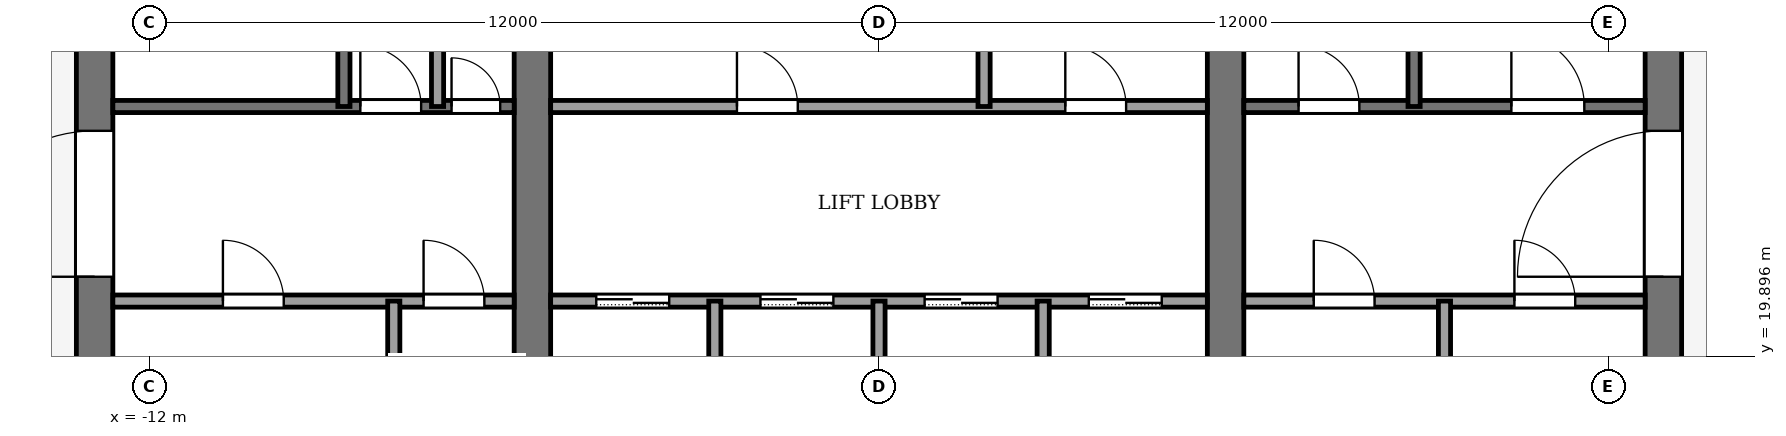
"""IFC4 building model, lengths in metres.
Left out: names, types, materials, properties, quantities, classifications, styles, units other than length and angle.
Written with IfcOpenShell. Run it as: python <this file> out.ifc"""

import sys

from ifc_helpers import new_model, si_unit, direction, frame, frame_2d, origin, place, context, subcontext, project, spatial, rectangle, extrude, element, fill, save


model = new_model("IFC4")
c1 = context("Model", 3, precision=1e-05, world=origin(), true_north=direction((0.0, 1.0)))
c2 = subcontext(c1, "Body", "Model", "MODEL_VIEW")
j1 = project(units=[si_unit("LENGTHUNIT", "METRE"), si_unit("PLANEANGLEUNIT", "RADIAN")], contexts=[c1])
p1 = place(None, origin())
s1 = spatial("IfcSite", under=j1, at=p1, CompositionType="ELEMENT")
p2 = place(p1, origin())
s2 = spatial("IfcBuilding", under=s1, at=p2, CompositionType="ELEMENT")
p3 = place(p2, frame((0.0, 0.0, 330.0)))
s3 = spatial("IfcBuildingStorey", under=s2, at=p3, CompositionType="ELEMENT", Elevation=330.0)
p4 = place(p3, frame((-12.9, 18.4, -0.13), z_axis=(0.0, 0.0, 1.0), x_axis=(0.0, 1.0, 0.0)))
e1 = element("IfcWall", 1, at=p4, inside=s3, PredefinedType="SHEAR", context=c2, shape_type="SweptSolid", body=[
    extrude(rectangle(XDim=19.2, YDim=0.6, at=frame_2d((9.6, 0.0))), origin(), (0.0, 0.0, 1.0), 3.95),
])
p5 = place(p4, frame((2.8, 0.0, 0.13)))
e2 = element("IfcOpeningElement", 2, at=p5, cuts=e1, PredefinedType="OPENING", context=c2, shape_type="SweptSolid", body=[
    extrude(rectangle(XDim=2.4, YDim=2.4, at=frame_2d((1.2, 1.2))), frame((0.0, 0.31, 0.0), z_axis=(0.0, -1.0, 0.0), x_axis=(1.0, 0.0, 0.0)), (0.0, 0.0, 1.0), 0.62),
])
p6 = place(p4, frame((13.4, 0.0, 0.13)))
e3 = element("IfcOpeningElement", 3, at=p6, cuts=e1, PredefinedType="OPENING", context=c2, shape_type="SweptSolid", body=[
    extrude(rectangle(XDim=1.4, YDim=2.2, at=frame_2d((0.7, 1.1))), frame((0.0, 0.31, 0.0), z_axis=(0.0, -1.0, 0.0), x_axis=(1.0, 0.0, 0.0)), (0.0, 0.0, 1.0), 0.62),
])
p7 = place(p3, frame((12.9, 18.4, -0.13), z_axis=(0.0, 0.0, 1.0), x_axis=(0.0, 1.0, 0.0)))
e4 = element("IfcWall", 4, at=p7, inside=s3, PredefinedType="SHEAR", context=c2, shape_type="SweptSolid", body=[
    extrude(rectangle(XDim=19.2, YDim=0.6, at=frame_2d((9.6, 0.0))), origin(), (0.0, 0.0, 1.0), 3.95),
])
p8 = place(p7, frame((2.8, 0.0, 0.13)))
e5 = element("IfcOpeningElement", 5, at=p8, cuts=e4, PredefinedType="OPENING", context=c2, shape_type="SweptSolid", body=[
    extrude(rectangle(XDim=2.4, YDim=2.4, at=frame_2d((1.2, 1.2))), frame((0.0, 0.31, 0.0), z_axis=(0.0, -1.0, 0.0), x_axis=(1.0, 0.0, 0.0)), (0.0, 0.0, 1.0), 0.62),
])
p9 = place(p7, frame((13.3, 0.0, 0.13)))
e6 = element("IfcOpeningElement", 6, at=p9, cuts=e4, PredefinedType="OPENING", context=c2, shape_type="SweptSolid", body=[
    extrude(rectangle(XDim=2.4, YDim=2.4, at=frame_2d((1.2, 1.2))), frame((0.0, 0.31, 0.0), z_axis=(0.0, -1.0, 0.0), x_axis=(1.0, 0.0, 0.0)), (0.0, 0.0, 1.0), 0.62),
])
p10 = place(p3, frame((-5.7, 18.4, -0.13), z_axis=(0.0, 0.0, 1.0), x_axis=(0.0, 1.0, 0.0)))
e7 = element("IfcWall", 7, at=p10, inside=s3, PredefinedType="SHEAR", context=c2, shape_type="SweptSolid", body=[
    extrude(rectangle(XDim=19.2, YDim=0.6, at=frame_2d((9.6, 0.0))), origin(), (0.0, 0.0, 1.0), 3.95),
])
p11 = place(p10, frame((8.35, 0.0, 0.13)))
e8 = element("IfcOpeningElement", 8, at=p11, cuts=e7, PredefinedType="OPENING", context=c2, shape_type="SweptSolid", body=[
    extrude(rectangle(XDim=0.9, YDim=2.1, at=frame_2d((0.45, 1.05))), frame((0.0, 0.31, 0.0), z_axis=(0.0, -1.0, 0.0), x_axis=(1.0, 0.0, 0.0)), (0.0, 0.0, 1.0), 0.62),
])
p12 = place(p3, frame((5.7, 18.4, -0.13), z_axis=(0.0, 0.0, 1.0), x_axis=(0.0, 1.0, 0.0)))
e9 = element("IfcWall", 9, at=p12, inside=s3, PredefinedType="SHEAR", context=c2, shape_type="SweptSolid", body=[
    extrude(rectangle(XDim=19.2, YDim=0.6, at=frame_2d((9.6, 0.0))), origin(), (0.0, 0.0, 1.0), 3.95),
])
p13 = place(p12, frame((8.35, 0.0, 0.13)))
e10 = element("IfcOpeningElement", 10, at=p13, cuts=e9, PredefinedType="OPENING", context=c2, shape_type="SweptSolid", body=[
    extrude(rectangle(XDim=0.9, YDim=2.1, at=frame_2d((0.45, 1.05))), frame((0.0, 0.31, 0.0), z_axis=(0.0, -1.0, 0.0), x_axis=(1.0, 0.0, 0.0)), (0.0, 0.0, 1.0), 0.62),
])
p14 = place(p12, frame((13.3, 0.0, 0.13)))
e11 = element("IfcOpeningElement", 11, at=p14, cuts=e9, PredefinedType="OPENING", context=c2, shape_type="SweptSolid", body=[
    extrude(rectangle(XDim=2.4, YDim=2.4, at=frame_2d((1.2, 1.2))), frame((0.0, 0.31, 0.0), z_axis=(0.0, -1.0, 0.0), x_axis=(1.0, 0.0, 0.0)), (0.0, 0.0, 1.0), 0.62),
])
p15 = place(p3, frame((-12.6, 20.8, 0.0), z_axis=(0.0, 0.0, 1.0), x_axis=(1.0, 0.0, 0.0)))
e12 = element("IfcWall", 12, at=p15, inside=s3, PredefinedType="PARTITIONING", context=c2, shape_type="SweptSolid", body=[
    extrude(rectangle(XDim=6.6, YDim=0.2, at=frame_2d((3.3, 0.0))), origin(), (0.0, 0.0, 1.0), 3.82),
])
p16 = place(p15, frame((1.81, 0.0, 0.0)))
e13 = element("IfcOpeningElement", 13, at=p16, cuts=e12, PredefinedType="OPENING", context=c2, shape_type="SweptSolid", body=[
    extrude(rectangle(XDim=1.0, YDim=2.1, at=frame_2d((0.5, 1.05))), frame((0.0, 0.11, 0.0), z_axis=(0.0, -1.0, 0.0), x_axis=(1.0, 0.0, 0.0)), (0.0, 0.0, 1.0), 0.22),
])
p17 = place(p15, frame((5.11, 0.0, 0.0)))
e14 = element("IfcOpeningElement", 14, at=p17, cuts=e12, PredefinedType="OPENING", context=c2, shape_type="SweptSolid", body=[
    extrude(rectangle(XDim=1.0, YDim=2.1, at=frame_2d((0.5, 1.05))), frame((0.0, 0.11, 0.0), z_axis=(0.0, -1.0, 0.0), x_axis=(1.0, 0.0, 0.0)), (0.0, 0.0, 1.0), 0.22),
])
p18 = place(p3, frame((-5.4, 20.8, 0.0), z_axis=(0.0, 0.0, 1.0), x_axis=(1.0, 0.0, 0.0)))
e15 = element("IfcWall", 15, at=p18, inside=s3, PredefinedType="PARTITIONING", context=c2, shape_type="SweptSolid", body=[
    extrude(rectangle(XDim=10.8, YDim=0.2, at=frame_2d((5.4, 0.0))), origin(), (0.0, 0.0, 1.0), 3.82),
])
p19 = place(p18, frame((0.75, 0.0, 0.0)))
e16 = element("IfcOpeningElement", 16, at=p19, cuts=e15, PredefinedType="OPENING", context=c2, shape_type="SweptSolid", body=[
    extrude(rectangle(XDim=1.2, YDim=2.2, at=frame_2d((0.6, 1.1))), frame((0.0, 0.11, 0.0), z_axis=(0.0, -1.0, 0.0), x_axis=(1.0, 0.0, 0.0)), (0.0, 0.0, 1.0), 0.22),
])
p20 = place(p18, frame((3.45, 0.0, 0.0)))
e17 = element("IfcOpeningElement", 17, at=p20, cuts=e15, PredefinedType="OPENING", context=c2, shape_type="SweptSolid", body=[
    extrude(rectangle(XDim=1.2, YDim=2.2, at=frame_2d((0.6, 1.1))), frame((0.0, 0.11, 0.0), z_axis=(0.0, -1.0, 0.0), x_axis=(1.0, 0.0, 0.0)), (0.0, 0.0, 1.0), 0.22),
])
p21 = place(p18, frame((6.15, 0.0, 0.0)))
e18 = element("IfcOpeningElement", 18, at=p21, cuts=e15, PredefinedType="OPENING", context=c2, shape_type="SweptSolid", body=[
    extrude(rectangle(XDim=1.2, YDim=2.2, at=frame_2d((0.6, 1.1))), frame((0.0, 0.11, 0.0), z_axis=(0.0, -1.0, 0.0), x_axis=(1.0, 0.0, 0.0)), (0.0, 0.0, 1.0), 0.22),
])
p22 = place(p18, frame((8.85, 0.0, 0.0)))
e19 = element("IfcOpeningElement", 19, at=p22, cuts=e15, PredefinedType="OPENING", context=c2, shape_type="SweptSolid", body=[
    extrude(rectangle(XDim=1.2, YDim=2.2, at=frame_2d((0.6, 1.1))), frame((0.0, 0.11, 0.0), z_axis=(0.0, -1.0, 0.0), x_axis=(1.0, 0.0, 0.0)), (0.0, 0.0, 1.0), 0.22),
])
p23 = place(p3, frame((6.0, 20.8, 0.0), z_axis=(0.0, 0.0, 1.0), x_axis=(1.0, 0.0, 0.0)))
e20 = element("IfcWall", 20, at=p23, inside=s3, PredefinedType="PARTITIONING", context=c2, shape_type="SweptSolid", body=[
    extrude(rectangle(XDim=6.6, YDim=0.2, at=frame_2d((3.3, 0.0))), origin(), (0.0, 0.0, 1.0), 3.82),
])
p24 = place(p23, frame((1.15, 0.0, 0.0)))
e21 = element("IfcOpeningElement", 21, at=p24, cuts=e20, PredefinedType="OPENING", context=c2, shape_type="SweptSolid", body=[
    extrude(rectangle(XDim=1.0, YDim=2.1, at=frame_2d((0.5, 1.05))), frame((0.0, 0.11, 0.0), z_axis=(0.0, -1.0, 0.0), x_axis=(1.0, 0.0, 0.0)), (0.0, 0.0, 1.0), 0.22),
])
p25 = place(p23, frame((4.45, 0.0, 0.0)))
e22 = element("IfcOpeningElement", 22, at=p25, cuts=e20, PredefinedType="OPENING", context=c2, shape_type="SweptSolid", body=[
    extrude(rectangle(XDim=1.0, YDim=2.1, at=frame_2d((0.5, 1.05))), frame((0.0, 0.11, 0.0), z_axis=(0.0, -1.0, 0.0), x_axis=(1.0, 0.0, 0.0)), (0.0, 0.0, 1.0), 0.22),
])
p26 = place(p3, frame((-12.6, 24.0, 0.0), z_axis=(0.0, 0.0, 1.0), x_axis=(1.0, 0.0, 0.0)))
e23 = element("IfcWall", 23, at=p26, inside=s3, PredefinedType="PARTITIONING", context=c2, shape_type="SweptSolid", body=[
    extrude(rectangle(XDim=6.6, YDim=0.2, at=frame_2d((3.3, 0.0))), origin(), (0.0, 0.0, 1.0), 3.82),
])
p27 = place(p26, frame((4.07, 0.0, 0.0)))
e24 = element("IfcOpeningElement", 24, at=p27, cuts=e23, PredefinedType="OPENING", context=c2, shape_type="SweptSolid", body=[
    extrude(rectangle(XDim=1.0, YDim=2.1, at=frame_2d((0.5, 1.05))), frame((0.0, 0.11, 0.0), z_axis=(0.0, -1.0, 0.0), x_axis=(1.0, 0.0, 0.0)), (0.0, 0.0, 1.0), 0.22),
])
p28 = place(p26, frame((5.57, 0.0, 0.0)))
e25 = element("IfcOpeningElement", 25, at=p28, cuts=e23, PredefinedType="OPENING", context=c2, shape_type="SweptSolid", body=[
    extrude(rectangle(XDim=0.8, YDim=2.1, at=frame_2d((0.4, 1.05))), frame((0.0, 0.11, 0.0), z_axis=(0.0, -1.0, 0.0), x_axis=(1.0, 0.0, 0.0)), (0.0, 0.0, 1.0), 0.22),
])
p29 = place(p3, frame((-5.4, 24.0, 0.0), z_axis=(0.0, 0.0, 1.0), x_axis=(1.0, 0.0, 0.0)))
e26 = element("IfcWall", 26, at=p29, inside=s3, PredefinedType="PARTITIONING", context=c2, shape_type="SweptSolid", body=[
    extrude(rectangle(XDim=10.8, YDim=0.2, at=frame_2d((5.4, 0.0))), origin(), (0.0, 0.0, 1.0), 3.82),
])
p30 = place(p29, frame((3.064, 0.0, 0.0)))
e27 = element("IfcOpeningElement", 27, at=p30, cuts=e26, PredefinedType="OPENING", context=c2, shape_type="SweptSolid", body=[
    extrude(rectangle(XDim=1.0, YDim=2.1, at=frame_2d((0.5, 1.05))), frame((0.0, 0.11, 0.0), z_axis=(0.0, -1.0, 0.0), x_axis=(1.0, 0.0, 0.0)), (0.0, 0.0, 1.0), 0.22),
])
p31 = place(p29, frame((8.464, 0.0, 0.0)))
e28 = element("IfcOpeningElement", 28, at=p31, cuts=e26, PredefinedType="OPENING", context=c2, shape_type="SweptSolid", body=[
    extrude(rectangle(XDim=1.0, YDim=2.1, at=frame_2d((0.5, 1.05))), frame((0.0, 0.11, 0.0), z_axis=(0.0, -1.0, 0.0), x_axis=(1.0, 0.0, 0.0)), (0.0, 0.0, 1.0), 0.22),
])
p32 = place(p3, frame((6.0, 24.0, 0.0), z_axis=(0.0, 0.0, 1.0), x_axis=(1.0, 0.0, 0.0)))
e29 = element("IfcWall", 29, at=p32, inside=s3, PredefinedType="PARTITIONING", context=c2, shape_type="SweptSolid", body=[
    extrude(rectangle(XDim=6.6, YDim=0.2, at=frame_2d((3.3, 0.0))), origin(), (0.0, 0.0, 1.0), 3.82),
])
p33 = place(p32, frame((0.9, 0.0, 0.0)))
e30 = element("IfcOpeningElement", 30, at=p33, cuts=e29, PredefinedType="OPENING", context=c2, shape_type="SweptSolid", body=[
    extrude(rectangle(XDim=1.0, YDim=2.1, at=frame_2d((0.5, 1.05))), frame((0.0, 0.11, 0.0), z_axis=(0.0, -1.0, 0.0), x_axis=(1.0, 0.0, 0.0)), (0.0, 0.0, 1.0), 0.22),
])
p34 = place(p32, frame((4.4, 0.0, 0.0)))
e31 = element("IfcOpeningElement", 31, at=p34, cuts=e29, PredefinedType="OPENING", context=c2, shape_type="SweptSolid", body=[
    extrude(rectangle(XDim=1.2, YDim=2.2, at=frame_2d((0.6, 1.1))), frame((0.0, 0.11, 0.0), z_axis=(0.0, -1.0, 0.0), x_axis=(1.0, 0.0, 0.0)), (0.0, 0.0, 1.0), 0.22),
])
p35 = place(p3, frame((-8.8, 24.0, 0.0), z_axis=(0.0, 0.0, 1.0), x_axis=(0.0, 1.0, 0.0)))
e32 = element("IfcWall", 32, at=p35, inside=s3, PredefinedType="PARTITIONING", context=c2, shape_type="SweptSolid", body=[
    extrude(rectangle(XDim=7.4, YDim=0.2, at=frame_2d((3.7, 0.0))), origin(), (0.0, 0.0, 1.0), 3.82),
])
p36 = place(p3, frame((-7.98, 18.4, 0.0), z_axis=(0.0, 0.0, 1.0), x_axis=(0.0, 1.0, 0.0)))
e33 = element("IfcWall", 33, at=p36, inside=s3, PredefinedType="PARTITIONING", context=c2, shape_type="SweptSolid", body=[
    extrude(rectangle(XDim=2.4, YDim=0.2, at=frame_2d((1.2, 0.0))), origin(), (0.0, 0.0, 1.0), 3.82),
])
p37 = place(p3, frame((-7.26, 24.0, 0.0), z_axis=(0.0, 0.0, 1.0), x_axis=(0.0, 1.0, 0.0)))
e34 = element("IfcWall", 34, at=p37, inside=s3, PredefinedType="PARTITIONING", context=c2, shape_type="SweptSolid", body=[
    extrude(rectangle(XDim=7.4, YDim=0.2, at=frame_2d((3.7, 0.0))), origin(), (0.0, 0.0, 1.0), 3.82),
])
for number, where, z_axis, x_axis in (
    (35, (-2.7, 18.4, 0.0), (0.0, 0.0, 1.0), (0.0, 1.0, 0.0)),
    (36, (0.0, 18.4, 0.0), (0.0, 0.0, 1.0), (0.0, 1.0, 0.0)),
):
    element("IfcWall", number, at=place(p3, frame(where, z_axis=z_axis, x_axis=x_axis)), inside=s3, PredefinedType="PARTITIONING", context=c2, shape_type="SweptSolid", body=[
        extrude(rectangle(XDim=2.4, YDim=0.2, at=frame_2d((1.2, 0.0))), origin(), (0.0, 0.0, 1.0), 3.82),
    ])
p38 = place(p3, frame((1.728, 24.0, 0.0), z_axis=(0.0, 0.0, 1.0), x_axis=(0.0, 1.0, 0.0)))
e37 = element("IfcWall", 37, at=p38, inside=s3, PredefinedType="PARTITIONING", context=c2, shape_type="SweptSolid", body=[
    extrude(rectangle(XDim=2.4, YDim=0.2, at=frame_2d((1.2, 0.0))), origin(), (0.0, 0.0, 1.0), 3.82),
])
p39 = place(p3, frame((2.7, 18.4, 0.0), z_axis=(0.0, 0.0, 1.0), x_axis=(0.0, 1.0, 0.0)))
e38 = element("IfcWall", 38, at=p39, inside=s3, PredefinedType="PARTITIONING", context=c2, shape_type="SweptSolid", body=[
    extrude(rectangle(XDim=2.4, YDim=0.2, at=frame_2d((1.2, 0.0))), origin(), (0.0, 0.0, 1.0), 3.82),
])
p40 = place(p3, frame((8.8, 24.0, 0.0), z_axis=(0.0, 0.0, 1.0), x_axis=(0.0, 1.0, 0.0)))
e39 = element("IfcWall", 39, at=p40, inside=s3, PredefinedType="PARTITIONING", context=c2, shape_type="SweptSolid", body=[
    extrude(rectangle(XDim=7.4, YDim=0.2, at=frame_2d((3.7, 0.0))), origin(), (0.0, 0.0, 1.0), 3.82),
])
p41 = place(p3, frame((9.3, 18.4, 0.0), z_axis=(0.0, 0.0, 1.0), x_axis=(0.0, 1.0, 0.0)))
e40 = element("IfcWall", 40, at=p41, inside=s3, PredefinedType="PARTITIONING", context=c2, shape_type="SweptSolid", body=[
    extrude(rectangle(XDim=2.4, YDim=0.2, at=frame_2d((1.2, 0.0))), origin(), (0.0, 0.0, 1.0), 3.82),
])
p42 = place(p19, origin())
e41 = element("IfcDoor", 41, at=p42, inside=s3, OperationType="SLIDING_TO_LEFT", PredefinedType="DOOR", context=c2, shape_type="SweptSolid", body=[
    extrude(rectangle(XDim=1.2, YDim=2.2, at=frame_2d((0.6, 1.1))), frame((0.0, 0.025, 0.0), z_axis=(0.0, -1.0, 0.0), x_axis=(1.0, 0.0, 0.0)), (0.0, 0.0, 1.0), 0.05),
])
fill(e16, e41)
p43 = place(p20, origin())
e42 = element("IfcDoor", 42, at=p43, inside=s3, OperationType="SLIDING_TO_LEFT", PredefinedType="DOOR", context=c2, shape_type="SweptSolid", body=[
    extrude(rectangle(XDim=1.2, YDim=2.2, at=frame_2d((0.6, 1.1))), frame((0.0, 0.025, 0.0), z_axis=(0.0, -1.0, 0.0), x_axis=(1.0, 0.0, 0.0)), (0.0, 0.0, 1.0), 0.05),
])
fill(e17, e42)
p44 = place(p21, origin())
e43 = element("IfcDoor", 43, at=p44, inside=s3, OperationType="SLIDING_TO_LEFT", PredefinedType="DOOR", context=c2, shape_type="SweptSolid", body=[
    extrude(rectangle(XDim=1.2, YDim=2.2, at=frame_2d((0.6, 1.1))), frame((0.0, 0.025, 0.0), z_axis=(0.0, -1.0, 0.0), x_axis=(1.0, 0.0, 0.0)), (0.0, 0.0, 1.0), 0.05),
])
fill(e18, e43)
p45 = place(p22, origin())
e44 = element("IfcDoor", 44, at=p45, inside=s3, OperationType="SLIDING_TO_LEFT", PredefinedType="DOOR", context=c2, shape_type="SweptSolid", body=[
    extrude(rectangle(XDim=1.2, YDim=2.2, at=frame_2d((0.6, 1.1))), frame((0.0, 0.025, 0.0), z_axis=(0.0, -1.0, 0.0), x_axis=(1.0, 0.0, 0.0)), (0.0, 0.0, 1.0), 0.05),
])
fill(e19, e44)
p46 = place(p30, origin())
e45 = element("IfcDoor", 45, at=p46, inside=s3, OperationType="SINGLE_SWING_RIGHT", PredefinedType="DOOR", context=c2, shape_type="SweptSolid", body=[
    extrude(rectangle(XDim=1.0, YDim=2.1, at=frame_2d((0.5, 1.05))), frame((0.0, 0.025, 0.0), z_axis=(0.0, -1.0, 0.0), x_axis=(1.0, 0.0, 0.0)), (0.0, 0.0, 1.0), 0.05),
])
fill(e27, e45)
p47 = place(p31, origin())
e46 = element("IfcDoor", 46, at=p47, inside=s3, OperationType="SINGLE_SWING_LEFT", PredefinedType="DOOR", context=c2, shape_type="SweptSolid", body=[
    extrude(rectangle(XDim=1.0, YDim=2.1, at=frame_2d((0.5, 1.05))), frame((0.0, 0.025, 0.0), z_axis=(0.0, -1.0, 0.0), x_axis=(1.0, 0.0, 0.0)), (0.0, 0.0, 1.0), 0.05),
])
fill(e28, e46)
p48 = place(p16, origin())
e47 = element("IfcDoor", 47, at=p48, inside=s3, OperationType="SINGLE_SWING_LEFT", PredefinedType="DOOR", context=c2, shape_type="SweptSolid", body=[
    extrude(rectangle(XDim=1.0, YDim=2.1, at=frame_2d((0.5, 1.05))), frame((0.0, 0.025, 0.0), z_axis=(0.0, -1.0, 0.0), x_axis=(1.0, 0.0, 0.0)), (0.0, 0.0, 1.0), 0.05),
])
fill(e13, e47)
p49 = place(p17, origin())
e48 = element("IfcDoor", 48, at=p49, inside=s3, OperationType="SINGLE_SWING_LEFT", PredefinedType="DOOR", context=c2, shape_type="SweptSolid", body=[
    extrude(rectangle(XDim=1.0, YDim=2.1, at=frame_2d((0.5, 1.05))), frame((0.0, 0.025, 0.0), z_axis=(0.0, -1.0, 0.0), x_axis=(1.0, 0.0, 0.0)), (0.0, 0.0, 1.0), 0.05),
])
fill(e14, e48)
p50 = place(p24, origin())
e49 = element("IfcDoor", 49, at=p50, inside=s3, OperationType="SINGLE_SWING_LEFT", PredefinedType="DOOR", context=c2, shape_type="SweptSolid", body=[
    extrude(rectangle(XDim=1.0, YDim=2.1, at=frame_2d((0.5, 1.05))), frame((0.0, 0.025, 0.0), z_axis=(0.0, -1.0, 0.0), x_axis=(1.0, 0.0, 0.0)), (0.0, 0.0, 1.0), 0.05),
])
fill(e21, e49)
p51 = place(p25, origin())
e50 = element("IfcDoor", 50, at=p51, inside=s3, OperationType="SINGLE_SWING_LEFT", PredefinedType="DOOR", context=c2, shape_type="SweptSolid", body=[
    extrude(rectangle(XDim=1.0, YDim=2.1, at=frame_2d((0.5, 1.05))), frame((0.0, 0.025, 0.0), z_axis=(0.0, -1.0, 0.0), x_axis=(1.0, 0.0, 0.0)), (0.0, 0.0, 1.0), 0.05),
])
fill(e22, e50)
p52 = place(p27, origin())
e51 = element("IfcDoor", 51, at=p52, inside=s3, OperationType="SINGLE_SWING_RIGHT", PredefinedType="DOOR", context=c2, shape_type="SweptSolid", body=[
    extrude(rectangle(XDim=1.0, YDim=2.1, at=frame_2d((0.5, 1.05))), frame((0.0, 0.025, 0.0), z_axis=(0.0, -1.0, 0.0), x_axis=(1.0, 0.0, 0.0)), (0.0, 0.0, 1.0), 0.05),
])
fill(e24, e51)
p53 = place(p28, origin())
e52 = element("IfcDoor", 52, at=p53, inside=s3, OperationType="SINGLE_SWING_LEFT", PredefinedType="DOOR", context=c2, shape_type="SweptSolid", body=[
    extrude(rectangle(XDim=0.8, YDim=2.1, at=frame_2d((0.4, 1.05))), frame((0.0, 0.025, 0.0), z_axis=(0.0, -1.0, 0.0), x_axis=(1.0, 0.0, 0.0)), (0.0, 0.0, 1.0), 0.05),
])
fill(e25, e52)
p54 = place(p33, origin())
e53 = element("IfcDoor", 53, at=p54, inside=s3, OperationType="SINGLE_SWING_RIGHT", PredefinedType="DOOR", context=c2, shape_type="SweptSolid", body=[
    extrude(rectangle(XDim=1.0, YDim=2.1, at=frame_2d((0.5, 1.05))), frame((0.0, 0.025, 0.0), z_axis=(0.0, -1.0, 0.0), x_axis=(1.0, 0.0, 0.0)), (0.0, 0.0, 1.0), 0.05),
])
fill(e30, e53)
p55 = place(p34, origin())
e54 = element("IfcDoor", 54, at=p55, inside=s3, OperationType="SINGLE_SWING_LEFT", PredefinedType="DOOR", context=c2, shape_type="SweptSolid", body=[
    extrude(rectangle(XDim=1.2, YDim=2.2, at=frame_2d((0.6, 1.1))), frame((0.0, 0.025, 0.0), z_axis=(0.0, -1.0, 0.0), x_axis=(1.0, 0.0, 0.0)), (0.0, 0.0, 1.0), 0.05),
])
fill(e31, e54)
p56 = place(p5, origin())
e55 = element("IfcDoor", 55, at=p56, inside=s3, OperationType="DOUBLE_DOOR_SINGLE_SWING", PredefinedType="DOOR", context=c2, shape_type="SweptSolid", body=[
    extrude(rectangle(XDim=2.4, YDim=2.4, at=frame_2d((1.2, 1.2))), frame((0.0, 0.025, 0.0), z_axis=(0.0, -1.0, 0.0), x_axis=(1.0, 0.0, 0.0)), (0.0, 0.0, 1.0), 0.05),
])
fill(e2, e55)
p57 = place(p8, origin())
e56 = element("IfcDoor", 56, at=p57, inside=s3, OperationType="DOUBLE_DOOR_SINGLE_SWING", PredefinedType="DOOR", context=c2, shape_type="SweptSolid", body=[
    extrude(rectangle(XDim=2.4, YDim=2.4, at=frame_2d((1.2, 1.2))), frame((0.0, 0.025, 0.0), z_axis=(0.0, -1.0, 0.0), x_axis=(1.0, 0.0, 0.0)), (0.0, 0.0, 1.0), 0.05),
])
fill(e5, e56)
save(model, sys.argv[1])
